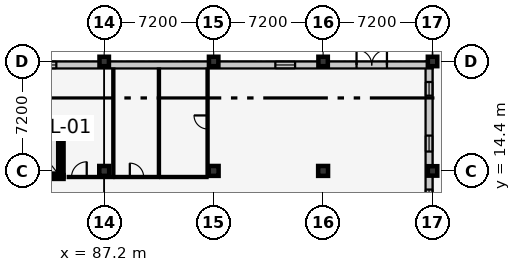
"""IFC4 building model, lengths in metres.
Left out: names, types, materials, properties, quantities, classifications, styles, units other than length and angle.
Written with IfcOpenShell. Run it as: python <this file> out.ifc"""

import sys

from ifc_helpers import new_model, si_unit, direction, frame, frame_2d, origin, origin_2d, place, context, subcontext, project, spatial, rectangle, extrude, element, fill, save


model = new_model("IFC4")
c1 = context("Model", 3, precision=1e-05, world=origin(), true_north=direction((0.0, 1.0)))
c2 = subcontext(c1, "Body", "Model", "MODEL_VIEW")
j1 = project(units=[si_unit("LENGTHUNIT", "METRE"), si_unit("PLANEANGLEUNIT", "RADIAN")], contexts=[c1])
p1 = place(None, origin())
s1 = spatial("IfcSite", under=j1, at=p1, CompositionType="ELEMENT")
p2 = place(p1, origin())
s2 = spatial("IfcBuilding", under=s1, at=p2, CompositionType="ELEMENT")
p3 = place(p2, origin())
s3 = spatial("IfcBuildingStorey", under=s2, at=p3, CompositionType="ELEMENT", Elevation=0.0)
p4 = place(p3, frame((87.2, 14.4, 0.0), z_axis=(0.0, 0.0, 1.0), x_axis=(1.0, 0.0, 0.0)))
e1 = element("IfcColumn", 1, at=p4, inside=s3, PredefinedType="COLUMN", context=c2, shape_type="SweptSolid", body=[
    extrude(rectangle(XDim=0.65, YDim=0.65, at=origin_2d()), origin(), (0.0, 0.0, 1.0), 5.4),
])
p5 = place(p3, frame((87.2, 21.6, 0.0), z_axis=(0.0, 0.0, 1.0), x_axis=(1.0, 0.0, 0.0)))
e2 = element("IfcColumn", 2, at=p5, inside=s3, PredefinedType="COLUMN", context=c2, shape_type="SweptSolid", body=[
    extrude(rectangle(XDim=0.62, YDim=0.62, at=origin_2d()), origin(), (0.0, 0.0, 1.0), 5.4),
])
p6 = place(p3, frame((94.4, 14.4, 0.0), z_axis=(0.0, 0.0, 1.0), x_axis=(1.0, 0.0, 0.0)))
e3 = element("IfcColumn", 3, at=p6, inside=s3, PredefinedType="COLUMN", context=c2, shape_type="SweptSolid", body=[
    extrude(rectangle(XDim=0.65, YDim=0.65, at=origin_2d()), origin(), (0.0, 0.0, 1.0), 5.4),
])
p7 = place(p3, frame((94.4, 21.6, 0.0), z_axis=(0.0, 0.0, 1.0), x_axis=(1.0, 0.0, 0.0)))
e4 = element("IfcColumn", 4, at=p7, inside=s3, PredefinedType="COLUMN", context=c2, shape_type="SweptSolid", body=[
    extrude(rectangle(XDim=0.62, YDim=0.62, at=origin_2d()), origin(), (0.0, 0.0, 1.0), 5.4),
])
p8 = place(p3, frame((101.6, 14.4, 0.0), z_axis=(0.0, 0.0, 1.0), x_axis=(1.0, 0.0, 0.0)))
e5 = element("IfcColumn", 5, at=p8, inside=s3, PredefinedType="COLUMN", context=c2, shape_type="SweptSolid", body=[
    extrude(rectangle(XDim=0.65, YDim=0.65, at=origin_2d()), origin(), (0.0, 0.0, 1.0), 5.4),
])
for number, where, z_axis, x_axis in (
    (6, (101.6, 21.6, 0.0), (0.0, 0.0, 1.0), (1.0, 0.0, 0.0)),
    (7, (108.8, 14.4, 0.0), (0.0, 0.0, 1.0), (1.0, 0.0, 0.0)),
    (8, (108.8, 21.6, 0.0), (0.0, 0.0, 1.0), (1.0, 0.0, 0.0)),
):
    element("IfcColumn", number, at=place(p3, frame(where, z_axis=z_axis, x_axis=x_axis)), inside=s3, PredefinedType="COLUMN", context=c2, shape_type="SweptSolid", body=[
        extrude(rectangle(XDim=0.62, YDim=0.62, at=origin_2d()), origin(), (0.0, 0.0, 1.0), 5.4),
    ])
p9 = place(p3, frame((108.57, 21.6, 0.0), z_axis=(0.0, 0.0, 1.0), x_axis=(0.0, -1.0, 0.0)))
e9 = element("IfcWall", 9, at=p9, inside=s3, PredefinedType="SOLIDWALL", context=c2, shape_type="SweptSolid", body=[
    extrude(rectangle(XDim=21.6, YDim=0.46, at=frame_2d((10.8, 0.0))), origin(), (0.0, 0.0, 1.0), 4.545),
])
p10 = place(p9, frame((1.35, 0.0, 0.9)))
e10 = element("IfcOpeningElement", 10, at=p10, cuts=e9, PredefinedType="OPENING", context=c2, shape_type="SweptSolid", body=[
    extrude(rectangle(XDim=0.9, YDim=1.6, at=frame_2d((0.45, 0.8))), frame((0.0, 0.242, 0.0), z_axis=(0.0, -1.0, 0.0), x_axis=(1.0, 0.0, 0.0)), (0.0, 0.0, 1.0), 0.484),
])
p11 = place(p9, frame((4.875, 0.0, 0.9)))
e11 = element("IfcOpeningElement", 11, at=p11, cuts=e9, PredefinedType="OPENING", context=c2, shape_type="SweptSolid", body=[
    extrude(rectangle(XDim=1.05, YDim=1.6, at=frame_2d((0.525, 0.8))), frame((0.0, 0.242, 0.0), z_axis=(0.0, -1.0, 0.0), x_axis=(1.0, 0.0, 0.0)), (0.0, 0.0, 1.0), 0.484),
])
p12 = place(p9, frame((8.425, 0.0, 0.9)))
e12 = element("IfcOpeningElement", 12, at=p12, cuts=e9, PredefinedType="OPENING", context=c2, shape_type="SweptSolid", body=[
    extrude(rectangle(XDim=1.15, YDim=1.6, at=frame_2d((0.575, 0.8))), frame((0.0, 0.242, 0.0), z_axis=(0.0, -1.0, 0.0), x_axis=(1.0, 0.0, 0.0)), (0.0, 0.0, 1.0), 0.484),
])
p13 = place(p9, frame((11.975, 0.0, 0.9)))
e13 = element("IfcOpeningElement", 13, at=p13, cuts=e9, PredefinedType="OPENING", context=c2, shape_type="SweptSolid", body=[
    extrude(rectangle(XDim=1.25, YDim=1.6, at=frame_2d((0.625, 0.8))), frame((0.0, 0.242, 0.0), z_axis=(0.0, -1.0, 0.0), x_axis=(1.0, 0.0, 0.0)), (0.0, 0.0, 1.0), 0.484),
])
p14 = place(p9, frame((15.51, 0.0, 0.9)))
e14 = element("IfcOpeningElement", 14, at=p14, cuts=e9, PredefinedType="OPENING", context=c2, shape_type="SweptSolid", body=[
    extrude(rectangle(XDim=1.38, YDim=1.6, at=frame_2d((0.69, 0.8))), frame((0.0, 0.242, 0.0), z_axis=(0.0, -1.0, 0.0), x_axis=(1.0, 0.0, 0.0)), (0.0, 0.0, 1.0), 0.484),
])
p15 = place(p9, frame((19.05, 0.0, 0.9)))
e15 = element("IfcOpeningElement", 15, at=p15, cuts=e9, PredefinedType="OPENING", context=c2, shape_type="SweptSolid", body=[
    extrude(rectangle(XDim=1.5, YDim=1.6, at=frame_2d((0.75, 0.8))), frame((0.0, 0.242, 0.0), z_axis=(0.0, -1.0, 0.0), x_axis=(1.0, 0.0, 0.0)), (0.0, 0.0, 1.0), 0.484),
])
p16 = place(p3, frame((58.4, 21.37, 0.0), z_axis=(0.0, 0.0, 1.0), x_axis=(1.0, 0.0, 0.0)))
e16 = element("IfcWall", 16, at=p16, inside=s3, PredefinedType="SOLIDWALL", context=c2, shape_type="SweptSolid", body=[
    extrude(rectangle(XDim=50.4, YDim=0.46, at=frame_2d((25.2, 0.0))), origin(), (0.0, 0.0, 1.0), 4.445),
])
p17 = place(p16, frame((45.4, 0.0, 0.0)))
e17 = element("IfcOpeningElement", 17, at=p17, cuts=e16, PredefinedType="OPENING", context=c2, shape_type="SweptSolid", body=[
    extrude(rectangle(XDim=2.0, YDim=2.35, at=frame_2d((1.0, 1.175))), frame((0.0, 0.242, 0.0), z_axis=(0.0, -1.0, 0.0), x_axis=(1.0, 0.0, 0.0)), (0.0, 0.0, 1.0), 0.484),
])
p18 = place(p16, frame((1.438, 0.0, 0.9)))
e18 = element("IfcOpeningElement", 18, at=p18, cuts=e16, PredefinedType="OPENING", context=c2, shape_type="SweptSolid", body=[
    extrude(rectangle(XDim=1.0, YDim=1.75, at=frame_2d((0.5, 0.875))), frame((0.0, 0.242, 0.0), z_axis=(0.0, -1.0, 0.0), x_axis=(1.0, 0.0, 0.0)), (0.0, 0.0, 1.0), 0.484),
])
p19 = place(p16, frame((9.072, 0.0, 0.9)))
e19 = element("IfcOpeningElement", 19, at=p19, cuts=e16, PredefinedType="OPENING", context=c2, shape_type="SweptSolid", body=[
    extrude(rectangle(XDim=1.24, YDim=1.75, at=frame_2d((0.62, 0.875))), frame((0.0, 0.242, 0.0), z_axis=(0.0, -1.0, 0.0), x_axis=(1.0, 0.0, 0.0)), (0.0, 0.0, 1.0), 0.484),
])
p20 = place(p16, frame((16.726, 0.0, 0.9)))
e20 = element("IfcOpeningElement", 20, at=p20, cuts=e16, PredefinedType="OPENING", context=c2, shape_type="SweptSolid", body=[
    extrude(rectangle(XDim=1.44, YDim=1.75, at=frame_2d((0.72, 0.875))), frame((0.0, 0.242, 0.0), z_axis=(0.0, -1.0, 0.0), x_axis=(1.0, 0.0, 0.0)), (0.0, 0.0, 1.0), 0.484),
])
p21 = place(p16, frame((24.75, 0.0, 0.9)))
e21 = element("IfcOpeningElement", 21, at=p21, cuts=e16, PredefinedType="OPENING", context=c2, shape_type="SweptSolid", body=[
    extrude(rectangle(XDim=0.9, YDim=1.35, at=frame_2d((0.45, 0.675))), frame((0.0, 0.242, 0.0), z_axis=(0.0, -1.0, 0.0), x_axis=(1.0, 0.0, 0.0)), (0.0, 0.0, 1.0), 0.484),
])
p22 = place(p16, frame((40.058, 0.0, 0.9)))
e22 = element("IfcOpeningElement", 22, at=p22, cuts=e16, PredefinedType="OPENING", context=c2, shape_type="SweptSolid", body=[
    extrude(rectangle(XDim=1.3, YDim=1.35, at=frame_2d((0.65, 0.675))), frame((0.0, 0.242, 0.0), z_axis=(0.0, -1.0, 0.0), x_axis=(1.0, 0.0, 0.0)), (0.0, 0.0, 1.0), 0.484),
])
p23 = place(p3, frame((81.475, 14.0, 0.0), z_axis=(0.0, 0.0, 1.0), x_axis=(1.0, 0.0, 0.0)))
e23 = element("IfcWall", 23, at=p23, inside=s3, PredefinedType="SHEAR", context=c2, shape_type="SweptSolid", body=[
    extrude(rectangle(XDim=3.05, YDim=0.25, at=frame_2d((1.525, 0.0))), origin(), (0.0, 0.0, 1.0), 5.15),
])
p24 = place(p23, frame((0.725, 0.0, 0.0)))
e24 = element("IfcOpeningElement", 24, at=p24, cuts=e23, PredefinedType="OPENING", context=c2, shape_type="SweptSolid", body=[
    extrude(rectangle(XDim=1.6, YDim=2.3, at=frame_2d((0.8, 1.15))), frame((0.0, 0.137, 0.0), z_axis=(0.0, -1.0, 0.0), x_axis=(1.0, 0.0, 0.0)), (0.0, 0.0, 1.0), 0.274),
])
p25 = place(p3, frame((84.525, 17.4, 0.0), z_axis=(0.0, 0.0, 1.0), x_axis=(-1.0, 0.0, 0.0)))
e25 = element("IfcWall", 25, at=p25, inside=s3, PredefinedType="SHEAR", context=c2, shape_type="SweptSolid", body=[
    extrude(rectangle(XDim=3.05, YDim=0.25, at=frame_2d((1.525, 0.0))), origin(), (0.0, 0.0, 1.0), 5.15),
])
p26 = place(p3, frame((84.4, 14.0, 0.0), z_axis=(0.0, 0.0, 1.0), x_axis=(0.0, 1.0, 0.0)))
e26 = element("IfcWall", 26, at=p26, inside=s3, PredefinedType="SHEAR", context=c2, shape_type="SweptSolid", body=[
    extrude(rectangle(XDim=3.4, YDim=0.25, at=frame_2d((1.7, 0.0))), origin(), (0.0, 0.0, 1.0), 5.15),
])
p27 = place(p3, frame((84.8, 14.0, 0.0), z_axis=(0.0, 0.0, 1.0), x_axis=(1.0, 0.0, 0.0)))
e27 = element("IfcWall", 27, at=p27, inside=s3, PredefinedType="PARTITIONING", context=c2, shape_type="SweptSolid", body=[
    extrude(rectangle(XDim=3.0, YDim=0.14, at=frame_2d((1.5, 0.0))), origin(), (0.0, 0.0, 1.0), 5.15),
])
p28 = place(p27, frame((0.25, 0.0, 0.0)))
e28 = element("IfcOpeningElement", 28, at=p28, cuts=e27, PredefinedType="OPENING", context=c2, shape_type="SweptSolid", body=[
    extrude(rectangle(XDim=1.0, YDim=2.1, at=frame_2d((0.5, 1.05))), frame((0.0, 0.082, 0.0), z_axis=(0.0, -1.0, 0.0), x_axis=(1.0, 0.0, 0.0)), (0.0, 0.0, 1.0), 0.164),
])
p29 = place(p3, frame((87.8, 14.08, 0.0), z_axis=(0.0, 0.0, 1.0), x_axis=(0.0, 1.0, 0.0)))
e29 = element("IfcWall", 29, at=p29, inside=s3, PredefinedType="PARTITIONING", context=c2, shape_type="SweptSolid", body=[
    extrude(rectangle(XDim=7.05, YDim=0.14, at=frame_2d((3.525, 0.0))), origin(), (0.0, 0.0, 1.0), 5.15),
])
p30 = place(p3, frame((87.88, 14.0, 0.0), z_axis=(0.0, 0.0, 1.0), x_axis=(1.0, 0.0, 0.0)))
e30 = element("IfcWall", 30, at=p30, inside=s3, PredefinedType="PARTITIONING", context=c2, shape_type="SweptSolid", body=[
    extrude(rectangle(XDim=2.92, YDim=0.14, at=frame_2d((1.46, 0.0))), origin(), (0.0, 0.0, 1.0), 5.15),
])
p31 = place(p30, frame((1.005, 0.0, 0.0)))
e31 = element("IfcOpeningElement", 31, at=p31, cuts=e30, PredefinedType="OPENING", context=c2, shape_type="SweptSolid", body=[
    extrude(rectangle(XDim=0.91, YDim=2.06, at=frame_2d((0.455, 1.03))), frame((0.0, 0.082, 0.0), z_axis=(0.0, -1.0, 0.0), x_axis=(1.0, 0.0, 0.0)), (0.0, 0.0, 1.0), 0.164),
])
p32 = place(p3, frame((90.8, 14.08, 0.0), z_axis=(0.0, 0.0, 1.0), x_axis=(0.0, 1.0, 0.0)))
e32 = element("IfcWall", 32, at=p32, inside=s3, PredefinedType="PARTITIONING", context=c2, shape_type="SweptSolid", body=[
    extrude(rectangle(XDim=7.05, YDim=0.14, at=frame_2d((3.525, 0.0))), origin(), (0.0, 0.0, 1.0), 4.675),
])
p33 = place(p3, frame((90.88, 14.0, 0.0), z_axis=(0.0, 0.0, 1.0), x_axis=(1.0, 0.0, 0.0)))
e33 = element("IfcWall", 33, at=p33, inside=s3, PredefinedType="PARTITIONING", context=c2, shape_type="SweptSolid", body=[
    extrude(rectangle(XDim=3.12, YDim=0.14, at=frame_2d((1.56, 0.0))), origin(), (0.0, 0.0, 1.0), 5.15),
])
p34 = place(p3, frame((94.0, 14.08, 0.0), z_axis=(0.0, 0.0, 1.0), x_axis=(0.0, 1.0, 0.0)))
e34 = element("IfcWall", 34, at=p34, inside=s3, PredefinedType="PARTITIONING", context=c2, shape_type="SweptSolid", body=[
    extrude(rectangle(XDim=7.05, YDim=0.14, at=frame_2d((3.525, 0.0))), origin(), (0.0, 0.0, 1.0), 5.15),
])
p35 = place(p34, frame((3.08, 0.0, 0.0)))
e35 = element("IfcOpeningElement", 35, at=p35, cuts=e34, PredefinedType="OPENING", context=c2, shape_type="SweptSolid", body=[
    extrude(rectangle(XDim=0.89, YDim=2.05, at=frame_2d((0.445, 1.025))), frame((0.0, 0.082, 0.0), z_axis=(0.0, -1.0, 0.0), x_axis=(1.0, 0.0, 0.0)), (0.0, 0.0, 1.0), 0.164),
])
p36 = place(p10, origin())
e36 = element("IfcWindow", 36, at=p36, inside=s3, PartitioningType="SINGLE_PANEL", PredefinedType="WINDOW", context=c2, shape_type="SweptSolid", body=[
    extrude(rectangle(XDim=0.9, YDim=1.6, at=frame_2d((0.45, 0.8))), frame((0.0, 0.03, 0.0), z_axis=(0.0, -1.0, 0.0), x_axis=(1.0, 0.0, 0.0)), (0.0, 0.0, 1.0), 0.06),
])
fill(e10, e36)
p37 = place(p11, origin())
e37 = element("IfcWindow", 37, at=p37, inside=s3, PartitioningType="SINGLE_PANEL", PredefinedType="WINDOW", context=c2, shape_type="SweptSolid", body=[
    extrude(rectangle(XDim=1.05, YDim=1.6, at=frame_2d((0.525, 0.8))), frame((0.0, 0.03, 0.0), z_axis=(0.0, -1.0, 0.0), x_axis=(1.0, 0.0, 0.0)), (0.0, 0.0, 1.0), 0.06),
])
fill(e11, e37)
p38 = place(p12, origin())
e38 = element("IfcWindow", 38, at=p38, inside=s3, PartitioningType="SINGLE_PANEL", PredefinedType="WINDOW", context=c2, shape_type="SweptSolid", body=[
    extrude(rectangle(XDim=1.15, YDim=1.6, at=frame_2d((0.575, 0.8))), frame((0.0, 0.03, 0.0), z_axis=(0.0, -1.0, 0.0), x_axis=(1.0, 0.0, 0.0)), (0.0, 0.0, 1.0), 0.06),
])
fill(e12, e38)
p39 = place(p17, origin())
e39 = element("IfcDoor", 39, at=p39, inside=s3, OperationType="DOUBLE_DOOR_SINGLE_SWING", PredefinedType="DOOR", context=c2, shape_type="SweptSolid", body=[
    extrude(rectangle(XDim=2.0, YDim=2.35, at=frame_2d((1.0, 1.175))), frame((0.0, 0.025, 0.0), z_axis=(0.0, -1.0, 0.0), x_axis=(1.0, 0.0, 0.0)), (0.0, 0.0, 1.0), 0.05),
])
fill(e17, e39)
p40 = place(p21, origin())
e40 = element("IfcWindow", 40, at=p40, inside=s3, PartitioningType="SINGLE_PANEL", PredefinedType="WINDOW", context=c2, shape_type="SweptSolid", body=[
    extrude(rectangle(XDim=0.9, YDim=1.35, at=frame_2d((0.45, 0.675))), frame((0.0, 0.03, 0.0), z_axis=(0.0, -1.0, 0.0), x_axis=(1.0, 0.0, 0.0)), (0.0, 0.0, 1.0), 0.06),
])
fill(e21, e40)
p41 = place(p22, origin())
e41 = element("IfcWindow", 41, at=p41, inside=s3, PartitioningType="SINGLE_PANEL", PredefinedType="WINDOW", context=c2, shape_type="SweptSolid", body=[
    extrude(rectangle(XDim=1.3, YDim=1.35, at=frame_2d((0.65, 0.675))), frame((0.0, 0.03, 0.0), z_axis=(0.0, -1.0, 0.0), x_axis=(1.0, 0.0, 0.0)), (0.0, 0.0, 1.0), 0.06),
])
fill(e22, e41)
p42 = place(p24, origin())
e42 = element("IfcDoor", 42, at=p42, inside=s3, OperationType="DOUBLE_DOOR_SLIDING", PredefinedType="DOOR", context=c2, shape_type="SweptSolid", body=[
    extrude(rectangle(XDim=1.6, YDim=2.3, at=frame_2d((0.8, 1.15))), frame((0.0, 0.025, 0.0), z_axis=(0.0, -1.0, 0.0), x_axis=(1.0, 0.0, 0.0)), (0.0, 0.0, 1.0), 0.05),
])
fill(e24, e42)
p43 = place(p28, origin())
e43 = element("IfcDoor", 43, at=p43, inside=s3, OperationType="SINGLE_SWING_RIGHT", PredefinedType="DOOR", context=c2, shape_type="SweptSolid", body=[
    extrude(rectangle(XDim=1.0, YDim=2.1, at=frame_2d((0.5, 1.05))), frame((0.0, 0.025, 0.0), z_axis=(0.0, -1.0, 0.0), x_axis=(1.0, 0.0, 0.0)), (0.0, 0.0, 1.0), 0.05),
])
fill(e28, e43)
p44 = place(p31, origin())
e44 = element("IfcDoor", 44, at=p44, inside=s3, OperationType="SINGLE_SWING_LEFT", PredefinedType="DOOR", context=c2, shape_type="SweptSolid", body=[
    extrude(rectangle(XDim=0.91, YDim=2.06, at=frame_2d((0.455, 1.03))), frame((0.0, 0.025, 0.0), z_axis=(0.0, -1.0, 0.0), x_axis=(1.0, 0.0, 0.0)), (0.0, 0.0, 1.0), 0.05),
])
fill(e31, e44)
p45 = place(p35, origin())
e45 = element("IfcDoor", 45, at=p45, inside=s3, OperationType="SINGLE_SWING_RIGHT", PredefinedType="DOOR", context=c2, shape_type="SweptSolid", body=[
    extrude(rectangle(XDim=0.89, YDim=2.05, at=frame_2d((0.445, 1.025))), frame((0.0, 0.025, 0.0), z_axis=(0.0, -1.0, 0.0), x_axis=(1.0, 0.0, 0.0)), (0.0, 0.0, 1.0), 0.05),
])
fill(e35, e45)
save(model, sys.argv[1])
